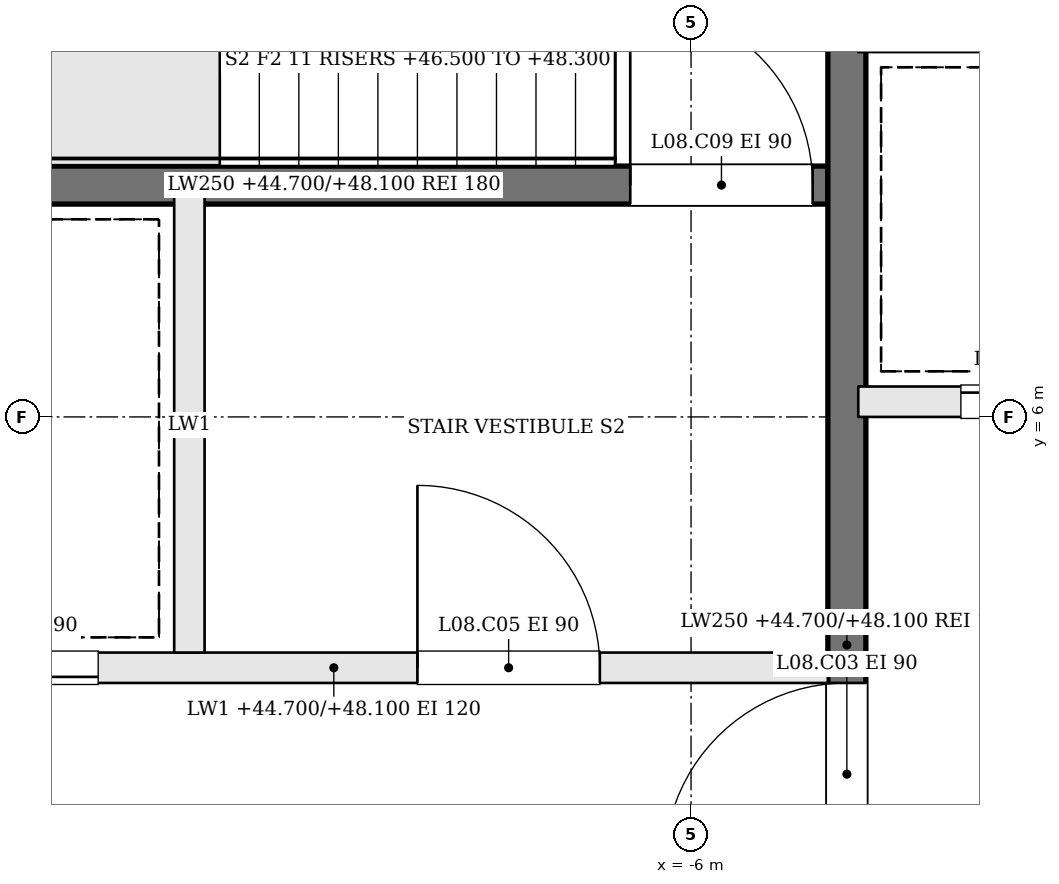
"""IFC4 building model, lengths in metres.
Left out: names, types, materials, properties, quantities, classifications, styles, units other than length and angle.
Written with IfcOpenShell. Run it as: python <this file> out.ifc"""

import sys

from ifc_helpers import new_model, si_unit, direction, frame, frame_2d, origin, place, context, subcontext, project, spatial, rectangle, extrude, element, fill, save


model = new_model("IFC4")
c1 = context("Model", 3, precision=1e-05, world=origin(), true_north=direction((0.0, 1.0)))
c2 = subcontext(c1, "Body", "Model", "MODEL_VIEW")
j1 = project(units=[si_unit("LENGTHUNIT", "METRE"), si_unit("PLANEANGLEUNIT", "RADIAN")], contexts=[c1])
p1 = place(None, origin())
s1 = spatial("IfcSite", under=j1, at=p1, CompositionType="ELEMENT")
p2 = place(p1, origin())
s2 = spatial("IfcBuilding", under=s1, at=p2, CompositionType="ELEMENT")
p3 = place(p2, frame((0.0, 0.0, 44.7)))
s3 = spatial("IfcBuildingStorey", under=s2, at=p3, CompositionType="ELEMENT", Elevation=44.7)
p4 = place(p3, frame((-11.6, 4.35, 0.0), z_axis=(0.0, 0.0, 1.0), x_axis=(1.0, 0.0, 0.0)))
e1 = element("IfcWall", 1, at=p4, inside=s3, PredefinedType="SOLIDWALL", context=c2, shape_type="SweptSolid", body=[
    extrude(rectangle(XDim=6.5, YDim=0.2, at=frame_2d((3.25, 0.0))), origin(), (0.0, 0.0, 1.0), 3.4),
])
p5 = place(p4, frame((3.8, 0.0, 0.0)))
e2 = element("IfcOpeningElement", 2, at=p5, cuts=e1, PredefinedType="OPENING", context=c2, shape_type="SweptSolid", body=[
    extrude(rectangle(XDim=1.2, YDim=2.1, at=frame_2d((0.6, 1.05))), frame((0.0, 0.11, 0.0), z_axis=(0.0, -1.0, 0.0), x_axis=(1.0, 0.0, 0.0)), (0.0, 0.0, 1.0), 0.22),
])
p6 = place(p4, frame((0.5, 0.0, 0.0)))
e3 = element("IfcOpeningElement", 3, at=p6, cuts=e1, PredefinedType="OPENING", context=c2, shape_type="SweptSolid", body=[
    extrude(rectangle(XDim=1.2, YDim=2.1, at=frame_2d((0.6, 1.05))), frame((0.0, 0.11, 0.0), z_axis=(0.0, -1.0, 0.0), x_axis=(1.0, 0.0, 0.0)), (0.0, 0.0, 1.0), 0.22),
])
p7 = place(p3, frame((-11.6, 7.525, 0.0), z_axis=(0.0, 0.0, 1.0), x_axis=(1.0, 0.0, 0.0)))
e4 = element("IfcWall", 4, at=p7, inside=s3, PredefinedType="SOLIDWALL", context=c2, shape_type="SweptSolid", body=[
    extrude(rectangle(XDim=6.5, YDim=0.25, at=frame_2d((3.25, 0.0))), origin(), (0.0, 0.0, 1.0), 3.4),
])
p8 = place(p7, frame((5.2, 0.0, 0.0)))
e5 = element("IfcOpeningElement", 5, at=p8, cuts=e4, PredefinedType="OPENING", context=c2, shape_type="SweptSolid", body=[
    extrude(rectangle(XDim=1.2, YDim=2.1, at=frame_2d((0.6, 1.05))), frame((0.0, 0.135, 0.0), z_axis=(0.0, -1.0, 0.0), x_axis=(1.0, 0.0, 0.0)), (0.0, 0.0, 1.0), 0.27),
])
p9 = place(p3, frame((-9.3, 4.45, 0.0), z_axis=(0.0, 0.0, 1.0), x_axis=(0.0, 1.0, 0.0)))
e6 = element("IfcWall", 6, at=p9, inside=s3, PredefinedType="SOLIDWALL", context=c2, shape_type="SweptSolid", body=[
    extrude(rectangle(XDim=3.0, YDim=0.2, at=frame_2d((1.5, 0.0))), origin(), (0.0, 0.0, 1.0), 3.4),
])
p10 = place(p3, frame((-4.975, -1.6, 0.0), z_axis=(0.0, 0.0, 1.0), x_axis=(0.0, 1.0, 0.0)))
e7 = element("IfcWall", 7, at=p10, inside=s3, PredefinedType="SOLIDWALL", context=c2, shape_type="SweptSolid", body=[
    extrude(rectangle(XDim=12.2, YDim=0.25, at=frame_2d((6.1, 0.0))), origin(), (0.0, 0.0, 1.0), 3.4),
])
p11 = place(p10, frame((4.65, 0.0, 0.0)))
e8 = element("IfcOpeningElement", 8, at=p11, cuts=e7, PredefinedType="OPENING", context=c2, shape_type="SweptSolid", body=[
    extrude(rectangle(XDim=1.2, YDim=2.1, at=frame_2d((0.6, 1.05))), frame((0.0, 0.135, 0.0), z_axis=(0.0, -1.0, 0.0), x_axis=(1.0, 0.0, 0.0)), (0.0, 0.0, 1.0), 0.27),
])
p12 = place(p3, frame((-4.9, 6.1, 0.0), z_axis=(0.0, 0.0, 1.0), x_axis=(1.0, 0.0, 0.0)))
e9 = element("IfcWall", 9, at=p12, inside=s3, PredefinedType="SOLIDWALL", context=c2, shape_type="SweptSolid", body=[
    extrude(rectangle(XDim=9.8, YDim=0.2, at=frame_2d((4.9, 0.0))), origin(), (0.0, 0.0, 1.0), 3.4),
])
p13 = place(p12, frame((0.675, 0.0, 0.0)))
e10 = element("IfcOpeningElement", 10, at=p13, cuts=e9, PredefinedType="OPENING", context=c2, shape_type="SweptSolid", body=[
    extrude(rectangle(XDim=1.1, YDim=2.1, at=frame_2d((0.55, 1.05))), frame((0.0, 0.11, 0.0), z_axis=(0.0, -1.0, 0.0), x_axis=(1.0, 0.0, 0.0)), (0.0, 0.0, 1.0), 0.22),
])
p14 = place(p12, frame((3.125, 0.0, 0.0)))
e11 = element("IfcOpeningElement", 11, at=p14, cuts=e9, PredefinedType="OPENING", context=c2, shape_type="SweptSolid", body=[
    extrude(rectangle(XDim=1.1, YDim=2.1, at=frame_2d((0.55, 1.05))), frame((0.0, 0.11, 0.0), z_axis=(0.0, -1.0, 0.0), x_axis=(1.0, 0.0, 0.0)), (0.0, 0.0, 1.0), 0.22),
])
p15 = place(p12, frame((5.575, 0.0, 0.0)))
e12 = element("IfcOpeningElement", 12, at=p15, cuts=e9, PredefinedType="OPENING", context=c2, shape_type="SweptSolid", body=[
    extrude(rectangle(XDim=1.1, YDim=2.1, at=frame_2d((0.55, 1.05))), frame((0.0, 0.11, 0.0), z_axis=(0.0, -1.0, 0.0), x_axis=(1.0, 0.0, 0.0)), (0.0, 0.0, 1.0), 0.22),
])
p16 = place(p12, frame((8.025, 0.0, 0.0)))
e13 = element("IfcOpeningElement", 13, at=p16, cuts=e9, PredefinedType="OPENING", context=c2, shape_type="SweptSolid", body=[
    extrude(rectangle(XDim=1.1, YDim=2.1, at=frame_2d((0.55, 1.05))), frame((0.0, 0.11, 0.0), z_axis=(0.0, -1.0, 0.0), x_axis=(1.0, 0.0, 0.0)), (0.0, 0.0, 1.0), 0.22),
])
p17 = place(p11, origin())
e14 = element("IfcDoor", 14, at=p17, inside=s3, OperationType="SINGLE_SWING_LEFT", PredefinedType="DOOR", context=c2, shape_type="SweptSolid", body=[
    extrude(rectangle(XDim=1.2, YDim=2.1, at=frame_2d((0.6, 1.05))), frame((0.0, 0.025, 0.0), z_axis=(0.0, -1.0, 0.0), x_axis=(1.0, 0.0, 0.0)), (0.0, 0.0, 1.0), 0.05),
])
fill(e8, e14)
p18 = place(p5, origin())
e15 = element("IfcDoor", 15, at=p18, inside=s3, OperationType="SINGLE_SWING_LEFT", PredefinedType="DOOR", context=c2, shape_type="SweptSolid", body=[
    extrude(rectangle(XDim=1.2, YDim=2.1, at=frame_2d((0.6, 1.05))), frame((0.0, 0.025, 0.0), z_axis=(0.0, -1.0, 0.0), x_axis=(1.0, 0.0, 0.0)), (0.0, 0.0, 1.0), 0.05),
])
fill(e2, e15)
p19 = place(p8, origin())
e16 = element("IfcDoor", 16, at=p19, inside=s3, OperationType="SINGLE_SWING_LEFT", PredefinedType="DOOR", context=c2, shape_type="SweptSolid", body=[
    extrude(rectangle(XDim=1.2, YDim=2.1, at=frame_2d((0.6, 1.05))), frame((0.0, 0.025, 0.0), z_axis=(0.0, -1.0, 0.0), x_axis=(1.0, 0.0, 0.0)), (0.0, 0.0, 1.0), 0.05),
])
fill(e5, e16)
p20 = place(p6, origin())
e17 = element("IfcDoor", 17, at=p20, inside=s3, OperationType="SLIDING_TO_RIGHT", PredefinedType="DOOR", context=c2, shape_type="SweptSolid", body=[
    extrude(rectangle(XDim=1.2, YDim=2.1, at=frame_2d((0.6, 1.05))), frame((0.0, 0.025, 0.0), z_axis=(0.0, -1.0, 0.0), x_axis=(1.0, 0.0, 0.0)), (0.0, 0.0, 1.0), 0.05),
])
fill(e3, e17)
p21 = place(p13, origin())
e18 = element("IfcDoor", 18, at=p21, inside=s3, OperationType="SLIDING_TO_RIGHT", PredefinedType="DOOR", context=c2, shape_type="SweptSolid", body=[
    extrude(rectangle(XDim=1.1, YDim=2.1, at=frame_2d((0.55, 1.05))), frame((0.0, 0.025, 0.0), z_axis=(0.0, -1.0, 0.0), x_axis=(1.0, 0.0, 0.0)), (0.0, 0.0, 1.0), 0.05),
])
fill(e10, e18)
save(model, sys.argv[1])
